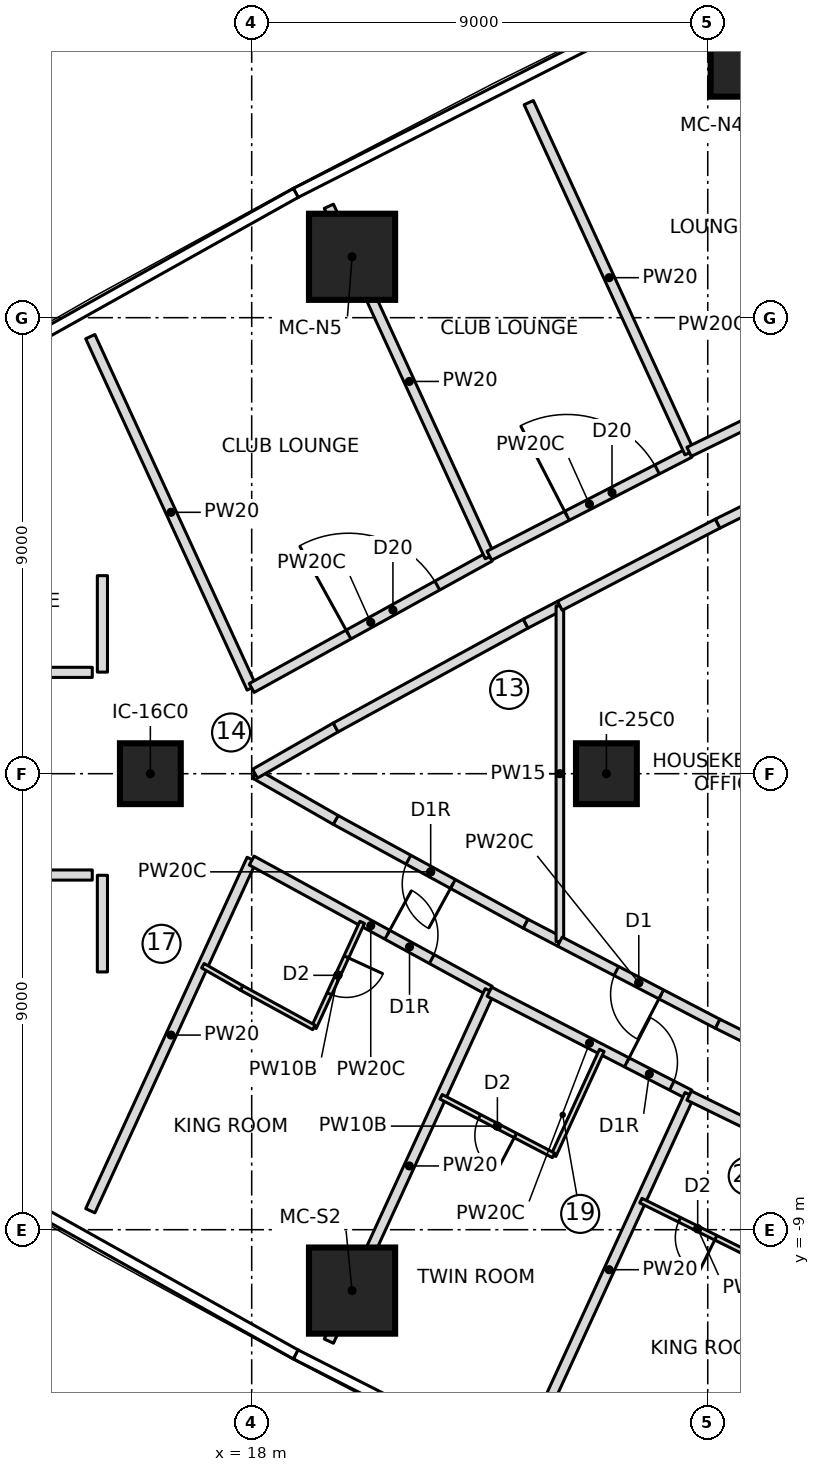
"""IFC4 building model, lengths in metres.
Left out: names, types, materials, properties, quantities, classifications, styles, units other than length and angle.
Written with IfcOpenShell. Run it as: python <this file> out.ifc"""

import sys

from ifc_helpers import new_model, si_unit, direction, frame, frame_2d, origin, origin_2d, place, context, subcontext, project, spatial, rectangle, extrude, element, fill, save


model = new_model("IFC4")
c1 = context("Model", 3, precision=1e-05, world=origin(), true_north=direction((0.0, 1.0)))
c2 = subcontext(c1, "Body", "Model", "MODEL_VIEW")
j1 = project(units=[si_unit("LENGTHUNIT", "METRE"), si_unit("PLANEANGLEUNIT", "RADIAN")], contexts=[c1])
p1 = place(None, origin())
s1 = spatial("IfcSite", under=j1, at=p1, CompositionType="ELEMENT")
p2 = place(p1, origin())
s2 = spatial("IfcBuilding", under=s1, at=p2, CompositionType="ELEMENT")
p3 = place(p2, frame((0.0, 0.0, 88.45)))
s3 = spatial("IfcBuildingStorey", under=s2, at=p3, CompositionType="ELEMENT", Elevation=88.45)
for number, where, z_axis, x_axis in (
    (1, (19.981, -10.202, 0.0), (0.0, 0.0, 1.0), (1.0, 0.0, 0.0)),
    (2, (27.907, 14.212, 0.0), (0.0, 0.0, 1.0), (1.0, 0.0, 0.0)),
    (3, (19.981, 10.202, 0.0), (0.0, 0.0, 1.0), (1.0, 0.0, 0.0)),
):
    element("IfcColumn", number, at=place(p3, frame(where, z_axis=z_axis, x_axis=x_axis)), inside=s3, PredefinedType="COLUMN", context=c2, shape_type="SweptSolid", body=[
        extrude(rectangle(XDim=1.7, YDim=1.7, at=origin_2d()), origin(), (0.0, 0.0, 1.0), 3.55),
    ])
for number, where, z_axis, x_axis in (
    (4, (16.0, 0.0, 0.0), (0.0, 0.0, 1.0), (1.0, 0.0, 0.0)),
    (5, (25.0, 0.0, 0.0), (0.0, 0.0, 1.0), (1.0, 0.0, 0.0)),
):
    element("IfcColumn", number, at=place(p3, frame(where, z_axis=z_axis, x_axis=x_axis)), inside=s3, PredefinedType="COLUMN", context=c2, shape_type="SweptSolid", body=[
        extrude(rectangle(XDim=1.2, YDim=1.2, at=origin_2d()), origin(), (0.0, 0.0, 1.0), 3.55),
    ])
p4 = place(p3, frame((5.145, 2.0, 0.0), z_axis=(0.0, 0.0, 1.0), x_axis=(1.0, 0.0, 0.0)))
e6 = element("IfcWall", 6, at=p4, inside=s3, PredefinedType="PARTITIONING", context=c2, shape_type="SweptSolid", body=[
    extrude(rectangle(XDim=9.709, YDim=0.2, at=frame_2d((4.854, 0.0))), origin(), (0.0, 0.0, 1.0), 3.25),
])
p5 = place(p4, frame((4.625, 0.0, 0.0)))
e7 = element("IfcOpeningElement", 7, at=p5, cuts=e6, PredefinedType="OPENING", context=c2, shape_type="SweptSolid", body=[
    extrude(rectangle(XDim=1.0, YDim=2.1, at=frame_2d((0.5, 1.05))), frame((0.0, 0.11, 0.0), z_axis=(0.0, -1.0, 0.0), x_axis=(1.0, 0.0, 0.0)), (0.0, 0.0, 1.0), 0.22),
])
p6 = place(p3, frame((5.145, -2.0, 0.0), z_axis=(0.0, 0.0, 1.0), x_axis=(1.0, 0.0, 0.0)))
e8 = element("IfcWall", 8, at=p6, inside=s3, PredefinedType="PARTITIONING", context=c2, shape_type="SweptSolid", body=[
    extrude(rectangle(XDim=9.709, YDim=0.2, at=frame_2d((4.854, 0.0))), origin(), (0.0, 0.0, 1.0), 3.25),
])
p7 = place(p6, frame((4.625, 0.0, 0.0)))
e9 = element("IfcOpeningElement", 9, at=p7, cuts=e8, PredefinedType="OPENING", context=c2, shape_type="SweptSolid", body=[
    extrude(rectangle(XDim=1.0, YDim=2.1, at=frame_2d((0.5, 1.05))), frame((0.0, 0.11, 0.0), z_axis=(0.0, -1.0, 0.0), x_axis=(1.0, 0.0, 0.0)), (0.0, 0.0, 1.0), 0.22),
])
p8 = place(p3, frame((14.815, 8.626, 0.0), z_axis=(0.0, 0.0, 1.0), x_axis=(0.417432341259, -0.908708006166, 0.0)))
e10 = element("IfcWall", 10, at=p8, inside=s3, PredefinedType="PARTITIONING", context=c2, shape_type="SweptSolid", body=[
    extrude(rectangle(XDim=7.631, YDim=0.2, at=frame_2d((3.815, 0.0))), origin(), (0.0, 0.0, 1.0), 3.25),
])
p9 = place(p3, frame((18.0, 1.692, 0.0), z_axis=(0.0, 0.0, 1.0), x_axis=(0.875548487611, 0.483130257634, 0.0)))
e11 = element("IfcWall", 11, at=p9, inside=s3, PredefinedType="PARTITIONING", context=c2, shape_type="SweptSolid", body=[
    extrude(rectangle(XDim=5.367, YDim=0.2, at=frame_2d((2.683, 0.0))), origin(), (0.0, 0.0, 1.0), 3.25),
])
p10 = place(p9, frame((2.183, 0.0, 0.0)))
e12 = element("IfcOpeningElement", 12, at=p10, cuts=e11, PredefinedType="OPENING", context=c2, shape_type="SweptSolid", body=[
    extrude(rectangle(XDim=2.0, YDim=2.4, at=frame_2d((1.0, 1.2))), frame((0.0, 0.11, 0.0), z_axis=(0.0, -1.0, 0.0), x_axis=(1.0, 0.0, 0.0)), (0.0, 0.0, 1.0), 0.22),
])
p11 = place(p3, frame((22.699, 4.284, 0.0), z_axis=(0.0, 0.0, 1.0), x_axis=(-0.417413534969, 0.908716644959, 0.0)))
e13 = element("IfcWall", 13, at=p11, inside=s3, PredefinedType="PARTITIONING", context=c2, shape_type="SweptSolid", body=[
    extrude(rectangle(XDim=7.609, YDim=0.2, at=frame_2d((3.805, 0.0))), origin(), (0.0, 0.0, 1.0), 3.25),
])
p12 = place(p3, frame((22.69, 4.302, 0.0), z_axis=(0.0, 0.0, 1.0), x_axis=(0.889236075961, 0.457448577667, 0.0)))
e14 = element("IfcWall", 14, at=p12, inside=s3, PredefinedType="PARTITIONING", context=c2, shape_type="SweptSolid", body=[
    extrude(rectangle(XDim=4.443, YDim=0.2, at=frame_2d((2.222, 0.0))), origin(), (0.0, 0.0, 1.0), 3.25),
])
p13 = place(p12, frame((1.721, 0.0, 0.0)))
e15 = element("IfcOpeningElement", 15, at=p13, cuts=e14, PredefinedType="OPENING", context=c2, shape_type="SweptSolid", body=[
    extrude(rectangle(XDim=2.0, YDim=2.4, at=frame_2d((1.0, 1.2))), frame((0.0, 0.11, 0.0), z_axis=(0.0, -1.0, 0.0), x_axis=(1.0, 0.0, 0.0)), (0.0, 0.0, 1.0), 0.22),
])
p14 = place(p3, frame((26.641, 6.335, 0.0), z_axis=(0.0, 0.0, 1.0), x_axis=(-0.417455028008, 0.908697584233, 0.0)))
e16 = element("IfcWall", 16, at=p14, inside=s3, PredefinedType="PARTITIONING", context=c2, shape_type="SweptSolid", body=[
    extrude(rectangle(XDim=7.603, YDim=0.2, at=frame_2d((3.802, 0.0))), origin(), (0.0, 0.0, 1.0), 3.25),
])
p15 = place(p3, frame((26.633, 6.353, 0.0), z_axis=(0.0, 0.0, 1.0), x_axis=(0.898502457097, 0.438968489291, 0.0)))
e17 = element("IfcWall", 17, at=p15, inside=s3, PredefinedType="PARTITIONING", context=c2, shape_type="SweptSolid", body=[
    extrude(rectangle(XDim=4.44, YDim=0.2, at=frame_2d((2.22, 0.0))), origin(), (0.0, 0.0, 1.0), 3.25),
])
p16 = place(p15, frame((1.72, 0.0, 0.0)))
e18 = element("IfcOpeningElement", 18, at=p16, cuts=e17, PredefinedType="OPENING", context=c2, shape_type="SweptSolid", body=[
    extrude(rectangle(XDim=1.0, YDim=2.1, at=frame_2d((0.5, 1.05))), frame((0.0, 0.11, 0.0), z_axis=(0.0, -1.0, 0.0), x_axis=(1.0, 0.0, 0.0)), (0.0, 0.0, 1.0), 0.22),
])
p17 = place(p3, frame((30.622, 8.302, 0.0), z_axis=(0.0, 0.0, 1.0), x_axis=(-0.417429919618, 0.90870911859, 0.0)))
e19 = element("IfcWall", 19, at=p17, inside=s3, PredefinedType="PARTITIONING", context=c2, shape_type="SweptSolid", body=[
    extrude(rectangle(XDim=7.6, YDim=0.2, at=frame_2d((3.8, 0.0))), origin(), (0.0, 0.0, 1.0), 3.25),
])
p18 = place(p3, frame((14.815, -8.626, 0.0), z_axis=(0.0, 0.0, 1.0), x_axis=(0.417432341259, 0.908708006166, 0.0)))
e20 = element("IfcWall", 20, at=p18, inside=s3, PredefinedType="PARTITIONING", context=c2, shape_type="SweptSolid", body=[
    extrude(rectangle(XDim=7.631, YDim=0.2, at=frame_2d((3.815, 0.0))), origin(), (0.0, 0.0, 1.0), 3.25),
])
p19 = place(p3, frame((18.0, -1.715, 0.0), z_axis=(0.0, 0.0, 1.0), x_axis=(0.877354946945, -0.479841950096, 0.0)))
e21 = element("IfcWall", 21, at=p19, inside=s3, PredefinedType="PARTITIONING", context=c2, shape_type="SweptSolid", body=[
    extrude(rectangle(XDim=5.355, YDim=0.2, at=frame_2d((2.678, 0.0))), origin(), (0.0, 0.0, 1.0), 3.25),
])
p20 = place(p19, frame((3.05, 0.0, 0.0)))
e22 = element("IfcOpeningElement", 22, at=p20, cuts=e21, PredefinedType="OPENING", context=c2, shape_type="SweptSolid", body=[
    extrude(rectangle(XDim=1.0, YDim=2.1, at=frame_2d((0.5, 1.05))), frame((0.0, 0.11, 0.0), z_axis=(0.0, -1.0, 0.0), x_axis=(1.0, 0.0, 0.0)), (0.0, 0.0, 1.0), 0.22),
])
p21 = place(p3, frame((20.18, -2.934, 0.0), z_axis=(0.0, 0.0, 1.0), x_axis=(-0.417450047292, -0.908699872354, 0.0)))
e23 = element("IfcWall", 23, at=p21, inside=s3, PredefinedType="PARTITIONING", context=c2, shape_type="SweptSolid", body=[
    extrude(rectangle(XDim=2.283, YDim=0.1, at=frame_2d((1.141, 0.0))), origin(), (0.0, 0.0, 1.0), 3.25),
])
p22 = place(p21, frame((0.75, 0.0, 0.0)))
e24 = element("IfcOpeningElement", 24, at=p22, cuts=e23, PredefinedType="OPENING", context=c2, shape_type="SweptSolid", body=[
    extrude(rectangle(XDim=0.8, YDim=2.1, at=frame_2d((0.4, 1.05))), frame((0.0, 0.06, 0.0), z_axis=(0.0, -1.0, 0.0), x_axis=(1.0, 0.0, 0.0)), (0.0, 0.0, 1.0), 0.12),
])
p23 = place(p3, frame((19.228, -5.008, 0.0), z_axis=(0.0, 0.0, 1.0), x_axis=(-0.877424481957, 0.479714788663, 0.0)))
e25 = element("IfcWall", 25, at=p23, inside=s3, PredefinedType="PARTITIONING", context=c2, shape_type="SweptSolid", body=[
    extrude(rectangle(XDim=1.625, YDim=0.1, at=frame_2d((0.813, 0.0))), origin(), (0.0, 0.0, 1.0), 3.25),
])
p24 = place(p3, frame((17.801, -4.229, 0.0), z_axis=(0.0, 0.0, 1.0), x_axis=(-0.867629162742, 0.497211862248, 0.0)))
e26 = element("IfcWall", 26, at=p24, inside=s3, PredefinedType="PARTITIONING", context=c2, shape_type="SweptSolid", body=[
    extrude(rectangle(XDim=0.882, YDim=0.1, at=frame_2d((0.441, 0.0))), origin(), (0.0, 0.0, 1.0), 3.25),
])
p25 = place(p3, frame((19.522, -11.199, 0.0), z_axis=(0.0, 0.0, 1.0), x_axis=(0.417413534969, 0.908716644959, 0.0)))
e27 = element("IfcWall", 27, at=p25, inside=s3, PredefinedType="PARTITIONING", context=c2, shape_type="SweptSolid", body=[
    extrude(rectangle(XDim=7.609, YDim=0.2, at=frame_2d((3.805, 0.0))), origin(), (0.0, 0.0, 1.0), 3.25),
])
p26 = place(p3, frame((22.69, -4.302, 0.0), z_axis=(0.0, 0.0, 1.0), x_axis=(0.889236075961, -0.457448577667, 0.0)))
e28 = element("IfcWall", 28, at=p26, inside=s3, PredefinedType="PARTITIONING", context=c2, shape_type="SweptSolid", body=[
    extrude(rectangle(XDim=4.443, YDim=0.2, at=frame_2d((2.222, 0.0))), origin(), (0.0, 0.0, 1.0), 3.25),
])
p27 = place(p26, frame((3.05, 0.0, 0.0)))
e29 = element("IfcOpeningElement", 29, at=p27, cuts=e28, PredefinedType="OPENING", context=c2, shape_type="SweptSolid", body=[
    extrude(rectangle(XDim=1.0, YDim=2.1, at=frame_2d((0.5, 1.05))), frame((0.0, 0.11, 0.0), z_axis=(0.0, -1.0, 0.0), x_axis=(1.0, 0.0, 0.0)), (0.0, 0.0, 1.0), 0.22),
])
p28 = place(p3, frame((24.909, -5.462, 0.0), z_axis=(0.0, 0.0, 1.0), x_axis=(-0.417454762401, -0.908697706253, 0.0)))
e30 = element("IfcWall", 30, at=p28, inside=s3, PredefinedType="PARTITIONING", context=c2, shape_type="SweptSolid", body=[
    extrude(rectangle(XDim=2.28, YDim=0.1, at=frame_2d((1.14, 0.0))), origin(), (0.0, 0.0, 1.0), 3.25),
])
p29 = place(p3, frame((23.958, -7.533, 0.0), z_axis=(0.0, 0.0, 1.0), x_axis=(-0.886911586599, 0.461939214135, 0.0)))
e31 = element("IfcWall", 31, at=p29, inside=s3, PredefinedType="PARTITIONING", context=c2, shape_type="SweptSolid", body=[
    extrude(rectangle(XDim=2.503, YDim=0.1, at=frame_2d((1.251, 0.0))), origin(), (0.0, 0.0, 1.0), 3.25),
])
p30 = place(p29, frame((0.85, 0.0, 0.0)))
e32 = element("IfcOpeningElement", 32, at=p30, cuts=e31, PredefinedType="OPENING", context=c2, shape_type="SweptSolid", body=[
    extrude(rectangle(XDim=0.8, YDim=2.1, at=frame_2d((0.4, 1.05))), frame((0.0, 0.06, 0.0), z_axis=(0.0, -1.0, 0.0), x_axis=(1.0, 0.0, 0.0)), (0.0, 0.0, 1.0), 0.12),
])
p31 = place(p3, frame((23.467, -13.244, 0.0), z_axis=(0.0, 0.0, 1.0), x_axis=(0.417455028008, 0.908697584233, 0.0)))
e33 = element("IfcWall", 33, at=p31, inside=s3, PredefinedType="PARTITIONING", context=c2, shape_type="SweptSolid", body=[
    extrude(rectangle(XDim=7.603, YDim=0.2, at=frame_2d((3.802, 0.0))), origin(), (0.0, 0.0, 1.0), 3.25),
])
p32 = place(p3, frame((26.633, -6.353, 0.0), z_axis=(0.0, 0.0, 1.0), x_axis=(0.898502457097, -0.438968489291, 0.0)))
e34 = element("IfcWall", 34, at=p32, inside=s3, PredefinedType="PARTITIONING", context=c2, shape_type="SweptSolid", body=[
    extrude(rectangle(XDim=4.44, YDim=0.2, at=frame_2d((2.22, 0.0))), origin(), (0.0, 0.0, 1.0), 3.25),
])
p33 = place(p32, frame((3.05, 0.0, 0.0)))
e35 = element("IfcOpeningElement", 35, at=p33, cuts=e34, PredefinedType="OPENING", context=c2, shape_type="SweptSolid", body=[
    extrude(rectangle(XDim=1.0, YDim=2.1, at=frame_2d((0.5, 1.05))), frame((0.0, 0.11, 0.0), z_axis=(0.0, -1.0, 0.0), x_axis=(1.0, 0.0, 0.0)), (0.0, 0.0, 1.0), 0.22),
])
p34 = place(p3, frame((27.922, -9.537, 0.0), z_axis=(0.0, 0.0, 1.0), x_axis=(-0.895944857815, 0.444165297784, 0.0)))
e36 = element("IfcWall", 36, at=p34, inside=s3, PredefinedType="PARTITIONING", context=c2, shape_type="SweptSolid", body=[
    extrude(rectangle(XDim=2.501, YDim=0.1, at=frame_2d((1.25, 0.0))), origin(), (0.0, 0.0, 1.0), 3.25),
])
p35 = place(p34, frame((0.85, 0.0, 0.0)))
e37 = element("IfcOpeningElement", 37, at=p35, cuts=e36, PredefinedType="OPENING", context=c2, shape_type="SweptSolid", body=[
    extrude(rectangle(XDim=0.8, YDim=2.1, at=frame_2d((0.4, 1.05))), frame((0.0, 0.06, 0.0), z_axis=(0.0, -1.0, 0.0), x_axis=(1.0, 0.0, 0.0)), (0.0, 0.0, 1.0), 0.12),
])
p36 = place(p3, frame((27.449, -15.208, 0.0), z_axis=(0.0, 0.0, 1.0), x_axis=(0.417429919618, 0.90870911859, 0.0)))
e38 = element("IfcWall", 38, at=p36, inside=s3, PredefinedType="PARTITIONING", context=c2, shape_type="SweptSolid", body=[
    extrude(rectangle(XDim=7.6, YDim=0.2, at=frame_2d((3.8, 0.0))), origin(), (0.0, 0.0, 1.0), 3.25),
])
p37 = place(p3, frame((23.407, -2.962, 0.0), z_axis=(0.0, 0.0, 1.0), x_axis=(-0.877465075585, 0.479640533242, 0.0)))
e39 = element("IfcWall", 39, at=p37, inside=s3, PredefinedType="PARTITIONING", context=c2, shape_type="SweptSolid", body=[
    extrude(rectangle(XDim=4.273, YDim=0.2, at=frame_2d((2.137, 0.0))), origin(), (0.0, 0.0, 1.0), 3.25),
])
p38 = place(p37, frame((1.636, 0.0, 0.0)))
e40 = element("IfcOpeningElement", 40, at=p38, cuts=e39, PredefinedType="OPENING", context=c2, shape_type="SweptSolid", body=[
    extrude(rectangle(XDim=1.0, YDim=2.1, at=frame_2d((0.5, 1.05))), frame((0.0, 0.11, 0.0), z_axis=(0.0, -1.0, 0.0), x_axis=(1.0, 0.0, 0.0)), (0.0, 0.0, 1.0), 0.22),
])
for number, where, z_axis, x_axis in (
    (41, (19.657, -0.912, 0.0), (0.0, 0.0, 1.0), (-0.868, 0.497, 0.0)),
    (42, (18.065, 0.0, 0.0), (0.0, 0.0, 1.0), (0.868, 0.497, 0.0)),
):
    element("IfcWall", number, at=place(p3, frame(where, z_axis=z_axis, x_axis=x_axis)), inside=s3, PredefinedType="PARTITIONING", context=c2, shape_type="SweptSolid", body=[
        extrude(rectangle(XDim=1.835, YDim=0.2, at=frame_2d((0.918, 0.0))), origin(), (0.0, 0.0, 1.0), 3.25),
    ])
p39 = place(p3, frame((19.657, 0.912, 0.0), z_axis=(0.0, 0.0, 1.0), x_axis=(0.877465075585, 0.479640533242, 0.0)))
e43 = element("IfcWall", 43, at=p39, inside=s3, PredefinedType="PARTITIONING", context=c2, shape_type="SweptSolid", body=[
    extrude(rectangle(XDim=4.273, YDim=0.2, at=frame_2d((2.137, 0.0))), origin(), (0.0, 0.0, 1.0), 3.25),
])
for number, where, z_axis, x_axis in (
    (44, (23.407, 2.962, 0.0), (0.0, 0.0, 1.0), (0.887, 0.462, 0.0)),
    (45, (24.082, -3.313, 0.0), (0.0, 0.0, 1.0), (-0.887, 0.462, 0.0)),
):
    element("IfcWall", number, at=place(p3, frame(where, z_axis=z_axis, x_axis=x_axis)), inside=s3, PredefinedType="PARTITIONING", context=c2, shape_type="SweptSolid", body=[
        extrude(rectangle(XDim=0.761, YDim=0.2, at=frame_2d((0.381, 0.0))), origin(), (0.0, 0.0, 1.0), 3.25),
    ])
p40 = place(p3, frame((24.082, -3.313, 0.0), z_axis=(0.0, 0.0, 1.0), x_axis=(0.0, 1.0, 0.0)))
e46 = element("IfcWall", 46, at=p40, inside=s3, PredefinedType="PARTITIONING", context=c2, shape_type="SweptSolid", body=[
    extrude(rectangle(XDim=6.627, YDim=0.15, at=frame_2d((3.313, 0.0))), origin(), (0.0, 0.0, 1.0), 3.25),
])
p41 = place(p3, frame((27.196, -4.936, 0.0), z_axis=(0.0, 0.0, 1.0), x_axis=(-0.886893314466, 0.461974294476, 0.0)))
e47 = element("IfcWall", 47, at=p41, inside=s3, PredefinedType="PARTITIONING", context=c2, shape_type="SweptSolid", body=[
    extrude(rectangle(XDim=3.512, YDim=0.2, at=frame_2d((1.756, 0.0))), origin(), (0.0, 0.0, 1.0), 3.25),
])
p42 = place(p41, frame((1.256, 0.0, 0.0)))
e48 = element("IfcOpeningElement", 48, at=p42, cuts=e47, PredefinedType="OPENING", context=c2, shape_type="SweptSolid", body=[
    extrude(rectangle(XDim=1.0, YDim=2.1, at=frame_2d((0.5, 1.05))), frame((0.0, 0.11, 0.0), z_axis=(0.0, -1.0, 0.0), x_axis=(1.0, 0.0, 0.0)), (0.0, 0.0, 1.0), 0.22),
])
p43 = place(p3, frame((30.099, -6.375, 0.0), z_axis=(0.0, 0.0, 1.0), x_axis=(-0.895974251126, 0.444106002345, 0.0)))
e49 = element("IfcWall", 49, at=p43, inside=s3, PredefinedType="PARTITIONING", context=c2, shape_type="SweptSolid", body=[
    extrude(rectangle(XDim=3.24, YDim=0.2, at=frame_2d((1.62, 0.0))), origin(), (0.0, 0.0, 1.0), 3.25),
])
p44 = place(p3, frame((24.082, 3.313, 0.0), z_axis=(0.0, 0.0, 1.0), x_axis=(0.886893314466, 0.461974294476, 0.0)))
e50 = element("IfcWall", 50, at=p44, inside=s3, PredefinedType="PARTITIONING", context=c2, shape_type="SweptSolid", body=[
    extrude(rectangle(XDim=3.512, YDim=0.2, at=frame_2d((1.756, 0.0))), origin(), (0.0, 0.0, 1.0), 3.25),
])
p45 = place(p3, frame((27.196, 4.936, 0.0), z_axis=(0.0, 0.0, 1.0), x_axis=(0.895974251126, 0.444106002345, 0.0)))
e51 = element("IfcWall", 51, at=p45, inside=s3, PredefinedType="PARTITIONING", context=c2, shape_type="SweptSolid", body=[
    extrude(rectangle(XDim=3.24, YDim=0.2, at=frame_2d((1.62, 0.0))), origin(), (0.0, 0.0, 1.0), 3.25),
])
p46 = place(p3, frame((15.054, 3.909, 0.0), z_axis=(0.0, 0.0, 1.0), x_axis=(0.0, -1.0, 0.0)))
e52 = element("IfcWall", 52, at=p46, inside=s3, PredefinedType="PARTITIONING", context=c2, shape_type="SweptSolid", body=[
    extrude(rectangle(XDim=1.904, YDim=0.2, at=frame_2d((0.952, 0.0))), origin(), (0.0, 0.0, 1.0), 3.25),
])
p47 = place(p3, frame((15.054, -2.005, 0.0), z_axis=(0.0, 0.0, 1.0), x_axis=(0.0, -1.0, 0.0)))
e53 = element("IfcWall", 53, at=p47, inside=s3, PredefinedType="PARTITIONING", context=c2, shape_type="SweptSolid", body=[
    extrude(rectangle(XDim=1.908, YDim=0.2, at=frame_2d((0.954, 0.0))), origin(), (0.0, 0.0, 1.0), 3.25),
])
p48 = place(p10, origin())
e54 = element("IfcDoor", 54, at=p48, inside=s3, OperationType="DOUBLE_DOOR_SINGLE_SWING", PredefinedType="DOOR", context=c2, shape_type="SweptSolid", body=[
    extrude(rectangle(XDim=2.0, YDim=2.4, at=frame_2d((1.0, 1.2))), frame((0.0, 0.025, 0.0), z_axis=(0.0, -1.0, 0.0), x_axis=(1.0, 0.0, 0.0)), (0.0, 0.0, 1.0), 0.05),
])
fill(e12, e54)
p49 = place(p13, origin())
e55 = element("IfcDoor", 55, at=p49, inside=s3, OperationType="DOUBLE_DOOR_SINGLE_SWING", PredefinedType="DOOR", context=c2, shape_type="SweptSolid", body=[
    extrude(rectangle(XDim=2.0, YDim=2.4, at=frame_2d((1.0, 1.2))), frame((0.0, 0.025, 0.0), z_axis=(0.0, -1.0, 0.0), x_axis=(1.0, 0.0, 0.0)), (0.0, 0.0, 1.0), 0.05),
])
fill(e15, e55)
p50 = place(p22, origin())
e56 = element("IfcDoor", 56, at=p50, inside=s3, OperationType="SINGLE_SWING_LEFT", PredefinedType="DOOR", context=c2, shape_type="SweptSolid", body=[
    extrude(rectangle(XDim=0.8, YDim=2.1, at=frame_2d((0.4, 1.05))), frame((0.0, 0.025, 0.0), z_axis=(0.0, -1.0, 0.0), x_axis=(1.0, 0.0, 0.0)), (0.0, 0.0, 1.0), 0.05),
])
fill(e24, e56)
p51 = place(p20, origin())
e57 = element("IfcDoor", 57, at=p51, inside=s3, OperationType="SINGLE_SWING_RIGHT", PredefinedType="DOOR", context=c2, shape_type="SweptSolid", body=[
    extrude(rectangle(XDim=1.0, YDim=2.1, at=frame_2d((0.5, 1.05))), frame((0.0, 0.025, 0.0), z_axis=(0.0, -1.0, 0.0), x_axis=(1.0, 0.0, 0.0)), (0.0, 0.0, 1.0), 0.05),
])
fill(e22, e57)
p52 = place(p30, origin())
e58 = element("IfcDoor", 58, at=p52, inside=s3, OperationType="SINGLE_SWING_LEFT", PredefinedType="DOOR", context=c2, shape_type="SweptSolid", body=[
    extrude(rectangle(XDim=0.8, YDim=2.1, at=frame_2d((0.4, 1.05))), frame((0.0, 0.025, 0.0), z_axis=(0.0, -1.0, 0.0), x_axis=(1.0, 0.0, 0.0)), (0.0, 0.0, 1.0), 0.05),
])
fill(e32, e58)
p53 = place(p27, origin())
e59 = element("IfcDoor", 59, at=p53, inside=s3, OperationType="SINGLE_SWING_RIGHT", PredefinedType="DOOR", context=c2, shape_type="SweptSolid", body=[
    extrude(rectangle(XDim=1.0, YDim=2.1, at=frame_2d((0.5, 1.05))), frame((0.0, 0.025, 0.0), z_axis=(0.0, -1.0, 0.0), x_axis=(1.0, 0.0, 0.0)), (0.0, 0.0, 1.0), 0.05),
])
fill(e29, e59)
p54 = place(p35, origin())
e60 = element("IfcDoor", 60, at=p54, inside=s3, OperationType="SINGLE_SWING_LEFT", PredefinedType="DOOR", context=c2, shape_type="SweptSolid", body=[
    extrude(rectangle(XDim=0.8, YDim=2.1, at=frame_2d((0.4, 1.05))), frame((0.0, 0.025, 0.0), z_axis=(0.0, -1.0, 0.0), x_axis=(1.0, 0.0, 0.0)), (0.0, 0.0, 1.0), 0.05),
])
fill(e37, e60)
p55 = place(p38, origin())
e61 = element("IfcDoor", 61, at=p55, inside=s3, OperationType="SINGLE_SWING_RIGHT", PredefinedType="DOOR", context=c2, shape_type="SweptSolid", body=[
    extrude(rectangle(XDim=1.0, YDim=2.1, at=frame_2d((0.5, 1.05))), frame((0.0, 0.025, 0.0), z_axis=(0.0, -1.0, 0.0), x_axis=(1.0, 0.0, 0.0)), (0.0, 0.0, 1.0), 0.05),
])
fill(e40, e61)
p56 = place(p42, origin())
e62 = element("IfcDoor", 62, at=p56, inside=s3, OperationType="SINGLE_SWING_LEFT", PredefinedType="DOOR", context=c2, shape_type="SweptSolid", body=[
    extrude(rectangle(XDim=1.0, YDim=2.1, at=frame_2d((0.5, 1.05))), frame((0.0, 0.025, 0.0), z_axis=(0.0, -1.0, 0.0), x_axis=(1.0, 0.0, 0.0)), (0.0, 0.0, 1.0), 0.05),
])
fill(e48, e62)
save(model, sys.argv[1])
